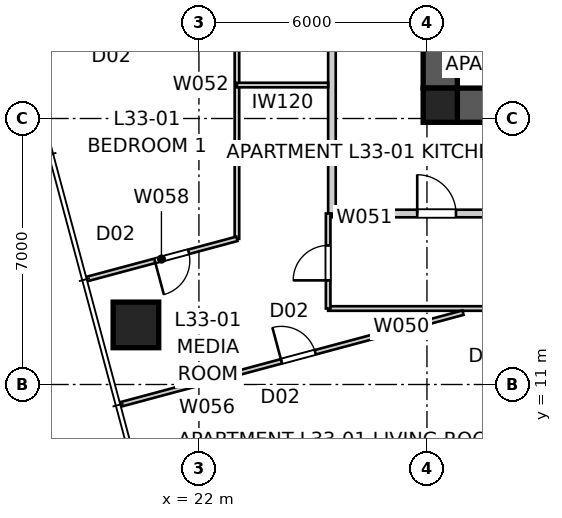
"""IFC4 building model, lengths in metres.
Left out: names, types, materials, properties, quantities, classifications, styles, units other than length and angle.
Written with IfcOpenShell. Run it as: python <this file> out.ifc"""

import sys

from ifc_helpers import new_model, si_unit, direction, frame, frame_2d, origin, origin_2d, place, context, subcontext, project, spatial, polyline, rectangle, outline, extrude, element, fill, save


model = new_model("IFC4")
c1 = context("Model", 3, precision=1e-05, world=origin(), true_north=direction((0.0, 1.0)))
c2 = subcontext(c1, "Body", "Model", "MODEL_VIEW")
j1 = project(units=[si_unit("LENGTHUNIT", "METRE"), si_unit("PLANEANGLEUNIT", "RADIAN")], contexts=[c1])
p1 = place(None, origin())
s1 = spatial("IfcSite", under=j1, at=p1, CompositionType="ELEMENT")
p2 = place(p1, origin())
s2 = spatial("IfcBuilding", under=s1, at=p2, CompositionType="ELEMENT")
p3 = place(p2, frame((0.0, 0.0, 121.8)))
s3 = spatial("IfcBuildingStorey", under=s2, at=p3, CompositionType="ELEMENT", Elevation=121.8)
p4 = place(p3, frame((51.2, 18.35, 0.0), z_axis=(0.0, 0.0, 1.0), x_axis=(-1.0, 0.0, 0.0)))
e1 = element("IfcWall", 1, at=p4, inside=s3, PredefinedType="SHEAR", context=c2, shape_type="SweptSolid", body=[
    extrude(outline(polyline([(0.0, -0.45), (22.4, -0.45), (22.4, -0.025), (22.85, -0.025), (22.85, 0.025), (22.4, 0.025), (22.4, 0.45), (0.0, 0.45), (0.0, 0.025), (-0.45, 0.025), (-0.45, -0.025), (0.0, -0.025), (0.0, -0.45)])), origin(), (0.0, 0.0, 1.0), 3.4),
])
p5 = place(p3, frame((28.35, 41.2, 0.0), z_axis=(0.0, 0.0, 1.0), x_axis=(0.0, -1.0, 0.0)))
e2 = element("IfcWall", 2, at=p5, inside=s3, PredefinedType="SHEAR", context=c2, shape_type="SweptSolid", body=[
    extrude(outline(polyline([(0.0, -0.45), (22.4, -0.45), (22.4, -0.025), (22.85, -0.025), (22.85, 0.025), (22.4, 0.025), (22.4, 0.45), (0.0, 0.45), (0.0, 0.025), (-0.45, 0.025), (-0.45, -0.025), (0.0, -0.025), (0.0, -0.45)])), origin(), (0.0, 0.0, 1.0), 3.4),
])
p6 = place(p5, frame((11.14, 0.0, 0.0)))
e3 = element("IfcOpeningElement", 3, at=p6, cuts=e2, PredefinedType="OPENING", context=c2, shape_type="SweptSolid", body=[
    extrude(rectangle(XDim=1.02, YDim=2.4, at=frame_2d((0.51, 1.2))), frame((0.0, 0.46, 0.0), z_axis=(0.0, -1.0, 0.0), x_axis=(1.0, 0.0, 0.0)), (0.0, 0.0, 1.0), 0.92),
])
p7 = place(p3, frame((28.35, 18.35, 0.0), z_axis=(0.0, 0.0, 1.0), x_axis=(1.0, 0.0, 0.0)))
e4 = element("IfcColumn", 4, at=p7, inside=s3, PredefinedType="COLUMN", context=c2, shape_type="SweptSolid", body=[
    extrude(rectangle(XDim=0.9, YDim=0.9, at=origin_2d()), origin(), (0.0, 0.0, 1.0), 3.4),
])
p8 = place(p3, frame((20.342, 12.568, 0.0), z_axis=(0.0, 0.0, 1.0), x_axis=(1.0, 0.0, 0.0)))
e5 = element("IfcColumn", 5, at=p8, inside=s3, PredefinedType="COLUMN", context=c2, shape_type="SweptSolid", body=[
    extrude(rectangle(XDim=1.2, YDim=1.2, at=origin_2d()), origin(), (0.0, 0.0, 1.0), 3.4),
])
p9 = place(p3, frame((25.5, 15.5, 0.0), z_axis=(0.0, 0.0, 1.0), x_axis=(1.0, 0.0, 0.0)))
e6 = element("IfcWall", 6, at=p9, inside=s3, PredefinedType="PARTITIONING", context=c2, shape_type="SweptSolid", body=[
    extrude(rectangle(XDim=28.2, YDim=0.2, at=frame_2d((14.1, 0.0))), origin(), (0.0, 0.0, 1.0), 3.25),
])
p10 = place(p9, frame((2.244, 0.0, 0.0)))
e7 = element("IfcOpeningElement", 7, at=p10, cuts=e6, PredefinedType="OPENING", context=c2, shape_type="SweptSolid", body=[
    extrude(rectangle(XDim=1.02, YDim=2.1, at=frame_2d((0.51, 1.05))), frame((0.0, 0.11, 0.0), z_axis=(0.0, -1.0, 0.0), x_axis=(1.0, 0.0, 0.0)), (0.0, 0.0, 1.0), 0.22),
])
p11 = place(p9, frame((9.542, 0.0, 0.0)))
e8 = element("IfcOpeningElement", 8, at=p11, cuts=e6, PredefinedType="OPENING", context=c2, shape_type="SweptSolid", body=[
    extrude(rectangle(XDim=1.02, YDim=2.34, at=frame_2d((0.51, 1.17))), frame((0.0, 0.11, 0.0), z_axis=(0.0, -1.0, 0.0), x_axis=(1.0, 0.0, 0.0)), (0.0, 0.0, 1.0), 0.22),
])
p12 = place(p9, frame((21.994, 0.0, 0.0)))
e9 = element("IfcOpeningElement", 9, at=p12, cuts=e6, PredefinedType="OPENING", context=c2, shape_type="SweptSolid", body=[
    extrude(rectangle(XDim=1.02, YDim=2.34, at=frame_2d((0.51, 1.17))), frame((0.0, 0.11, 0.0), z_axis=(0.0, -1.0, 0.0), x_axis=(1.0, 0.0, 0.0)), (0.0, 0.0, 1.0), 0.22),
])
p13 = place(p3, frame((25.5, 43.7, 0.0), z_axis=(0.0, 0.0, 1.0), x_axis=(0.0, -1.0, 0.0)))
e10 = element("IfcWall", 10, at=p13, inside=s3, PredefinedType="PARTITIONING", context=c2, shape_type="SweptSolid", body=[
    extrude(rectangle(XDim=28.2, YDim=0.2, at=frame_2d((14.1, 0.0))), origin(), (0.0, 0.0, 1.0), 3.25),
])
p14 = place(p13, frame((8.742, 0.0, 0.0)))
e11 = element("IfcOpeningElement", 11, at=p14, cuts=e10, PredefinedType="OPENING", context=c2, shape_type="SweptSolid", body=[
    extrude(rectangle(XDim=1.02, YDim=2.34, at=frame_2d((0.51, 1.17))), frame((0.0, 0.11, 0.0), z_axis=(0.0, -1.0, 0.0), x_axis=(1.0, 0.0, 0.0)), (0.0, 0.0, 1.0), 0.22),
])
p15 = place(p13, frame((1.808, 0.0, 0.0)))
e12 = element("IfcOpeningElement", 12, at=p15, cuts=e10, PredefinedType="OPENING", context=c2, shape_type="SweptSolid", body=[
    extrude(rectangle(XDim=1.02, YDim=2.1, at=frame_2d((0.51, 1.05))), frame((0.0, 0.11, 0.0), z_axis=(0.0, -1.0, 0.0), x_axis=(1.0, 0.0, 0.0)), (0.0, 0.0, 1.0), 0.22),
])
p16 = place(p3, frame((41.07, 13.0, 0.0), z_axis=(0.0, 0.0, 1.0), x_axis=(-1.0, 0.0, 0.0)))
e13 = element("IfcWall", 13, at=p16, inside=s3, PredefinedType="PARTITIONING", context=c2, shape_type="SweptSolid", body=[
    extrude(rectangle(XDim=15.67, YDim=0.12, at=frame_2d((7.835, 0.0))), origin(), (0.0, 0.0, 1.0), 2.55),
])
p17 = place(p16, frame((5.772, 0.0, 0.0)))
e14 = element("IfcOpeningElement", 14, at=p17, cuts=e13, PredefinedType="OPENING", context=c2, shape_type="SweptSolid", body=[
    extrude(rectangle(XDim=0.92, YDim=2.34, at=frame_2d((0.46, 1.17))), frame((0.0, 0.07, 0.0), z_axis=(0.0, -1.0, 0.0), x_axis=(1.0, 0.0, 0.0)), (0.0, 0.0, 1.0), 0.14),
])
p18 = place(p16, frame((8.289, 0.0, 0.0)))
e15 = element("IfcOpeningElement", 15, at=p18, cuts=e13, PredefinedType="OPENING", context=c2, shape_type="SweptSolid", body=[
    extrude(rectangle(XDim=0.96, YDim=2.1, at=frame_2d((0.48, 1.05))), frame((0.0, 0.07, 0.0), z_axis=(0.0, -1.0, 0.0), x_axis=(1.0, 0.0, 0.0)), (0.0, 0.0, 1.0), 0.14),
])
p19 = place(p3, frame((25.4, 13.0, 0.0), z_axis=(0.0, 0.0, 1.0), x_axis=(0.0, 1.0, 0.0)))
e16 = element("IfcWall", 16, at=p19, inside=s3, PredefinedType="PARTITIONING", context=c2, shape_type="SweptSolid", body=[
    extrude(rectangle(XDim=2.5, YDim=0.12, at=frame_2d((1.25, 0.0))), origin(), (0.0, 0.0, 1.0), 3.25),
])
p20 = place(p19, frame((0.74, 0.0, 0.0)))
e17 = element("IfcOpeningElement", 17, at=p20, cuts=e16, PredefinedType="OPENING", context=c2, shape_type="SweptSolid", body=[
    extrude(rectangle(XDim=0.92, YDim=2.34, at=frame_2d((0.46, 1.17))), frame((0.0, 0.07, 0.0), z_axis=(0.0, -1.0, 0.0), x_axis=(1.0, 0.0, 0.0)), (0.0, 0.0, 1.0), 0.14),
])
p21 = place(p3, frame((23.0, 14.833, 0.0), z_axis=(0.0, 0.0, 1.0), x_axis=(0.0, 1.0, 0.0)))
e18 = element("IfcWall", 18, at=p21, inside=s3, PredefinedType="PARTITIONING", context=c2, shape_type="SweptSolid", body=[
    extrude(rectangle(XDim=14.034, YDim=0.12, at=frame_2d((7.017, 0.0))), origin(), (0.0, 0.0, 1.0), 2.55),
])
p22 = place(p21, frame((11.843, 0.0, 0.0)))
e19 = element("IfcOpeningElement", 19, at=p22, cuts=e18, PredefinedType="OPENING", context=c2, shape_type="SweptSolid", body=[
    extrude(rectangle(XDim=0.96, YDim=2.1, at=frame_2d((0.48, 1.05))), frame((0.0, 0.07, 0.0), z_axis=(0.0, -1.0, 0.0), x_axis=(1.0, 0.0, 0.0)), (0.0, 0.0, 1.0), 0.14),
])
p23 = place(p21, frame((8.104, 0.0, 0.0)))
e20 = element("IfcOpeningElement", 20, at=p23, cuts=e18, PredefinedType="OPENING", context=c2, shape_type="SweptSolid", body=[
    extrude(rectangle(XDim=0.96, YDim=2.1, at=frame_2d((0.48, 1.05))), frame((0.0, 0.07, 0.0), z_axis=(0.0, -1.0, 0.0), x_axis=(1.0, 0.0, 0.0)), (0.0, 0.0, 1.0), 0.14),
])
p24 = place(p3, frame((25.4, 18.88, 0.0), z_axis=(0.0, 0.0, 1.0), x_axis=(-1.0, 0.0, 0.0)))
e21 = element("IfcWall", 21, at=p24, inside=s3, PredefinedType="PARTITIONING", context=c2, shape_type="SweptSolid", body=[
    extrude(rectangle(XDim=2.4, YDim=0.12, at=frame_2d((1.2, 0.0))), origin(), (0.0, 0.0, 1.0), 2.722),
])
p25 = place(p3, frame((19.911, 10.468, 0.0), z_axis=(0.0, 0.0, 1.0), x_axis=(0.965927203676, 0.25881390457, 0.0)))
e22 = element("IfcWall", 22, at=p25, inside=s3, PredefinedType="PARTITIONING", context=c2, shape_type="SweptSolid", body=[
    extrude(rectangle(XDim=9.357, YDim=0.12, at=frame_2d((4.678, 0.0))), origin(), (0.0, 0.0, 1.0), 2.638),
])
p26 = place(p25, frame((4.411, 0.0, 0.0)))
e23 = element("IfcOpeningElement", 23, at=p26, cuts=e22, PredefinedType="OPENING", context=c2, shape_type="SweptSolid", body=[
    extrude(rectangle(XDim=0.92, YDim=2.34, at=frame_2d((0.46, 1.17))), frame((0.0, 0.07, 0.0), z_axis=(0.0, -1.0, 0.0), x_axis=(1.0, 0.0, 0.0)), (0.0, 0.0, 1.0), 0.14),
])
p27 = place(p3, frame((23.0, 14.833, 0.0), z_axis=(0.0, 0.0, 1.0), x_axis=(-0.965927919062, -0.258811234642, 0.0)))
e24 = element("IfcWall", 24, at=p27, inside=s3, PredefinedType="PARTITIONING", context=c2, shape_type="SweptSolid", body=[
    extrude(rectangle(XDim=4.114, YDim=0.12, at=frame_2d((2.057, 0.0))), origin(), (0.0, 0.0, 1.0), 3.25),
])
p28 = place(p27, frame((1.317, 0.0, 0.0)))
e25 = element("IfcOpeningElement", 25, at=p28, cuts=e24, PredefinedType="OPENING", context=c2, shape_type="SweptSolid", body=[
    extrude(rectangle(XDim=0.92, YDim=2.34, at=frame_2d((0.46, 1.17))), frame((0.0, 0.07, 0.0), z_axis=(0.0, -1.0, 0.0), x_axis=(1.0, 0.0, 0.0)), (0.0, 0.0, 1.0), 0.14),
])
p29 = place(p10, origin())
e26 = element("IfcDoor", 26, at=p29, inside=s3, OperationType="SINGLE_SWING_LEFT", PredefinedType="DOOR", context=c2, shape_type="SweptSolid", body=[
    extrude(rectangle(XDim=1.02, YDim=2.1, at=frame_2d((0.51, 1.05))), frame((0.0, 0.025, 0.0), z_axis=(0.0, -1.0, 0.0), x_axis=(1.0, 0.0, 0.0)), (0.0, 0.0, 1.0), 0.05),
])
fill(e7, e26)
p30 = place(p20, origin())
e27 = element("IfcDoor", 27, at=p30, inside=s3, OperationType="SINGLE_SWING_LEFT", PredefinedType="DOOR", context=c2, shape_type="SweptSolid", body=[
    extrude(rectangle(XDim=0.92, YDim=2.34, at=frame_2d((0.46, 1.17))), frame((0.0, 0.025, 0.0), z_axis=(0.0, -1.0, 0.0), x_axis=(1.0, 0.0, 0.0)), (0.0, 0.0, 1.0), 0.05),
])
fill(e17, e27)
p31 = place(p26, origin())
e28 = element("IfcDoor", 28, at=p31, inside=s3, OperationType="SINGLE_SWING_LEFT", PredefinedType="DOOR", context=c2, shape_type="SweptSolid", body=[
    extrude(rectangle(XDim=0.92, YDim=2.34, at=frame_2d((0.46, 1.17))), frame((0.0, 0.025, 0.0), z_axis=(0.0, -1.0, 0.0), x_axis=(1.0, 0.0, 0.0)), (0.0, 0.0, 1.0), 0.05),
])
fill(e23, e28)
p32 = place(p28, origin())
e29 = element("IfcDoor", 29, at=p32, inside=s3, OperationType="SINGLE_SWING_RIGHT", PredefinedType="DOOR", context=c2, shape_type="SweptSolid", body=[
    extrude(rectangle(XDim=0.92, YDim=2.34, at=frame_2d((0.46, 1.17))), frame((0.0, 0.025, 0.0), z_axis=(0.0, -1.0, 0.0), x_axis=(1.0, 0.0, 0.0)), (0.0, 0.0, 1.0), 0.05),
])
fill(e25, e29)
save(model, sys.argv[1])
